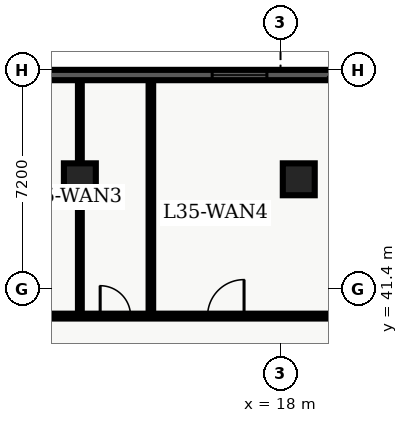
"""IFC4 building model, lengths in metres.
Left out: names, types, materials, properties, quantities, classifications, styles, units other than length and angle.
Written with IfcOpenShell. Run it as: python <this file> out.ifc"""

import sys

from ifc_helpers import new_model, entity, si_unit, converted_unit, direction, frame, origin_with_axes, origin_2d_with_axis, place, context, subcontext, project, spatial, polyline, rectangle, outline, extrude, element, fill, save


model = new_model("IFC4")
c1 = context("Model", 3, precision=1e-05, world=origin_with_axes(), true_north=direction((0.0, 1.0)))
c2 = subcontext(c1, "Body", "Model", "MODEL_VIEW")
j1 = project(units=[si_unit("LENGTHUNIT", "METRE"), converted_unit("PLANEANGLEUNIT", "DEGREE", entity("IfcPlaneAngleMeasure", 0.017), si_unit("PLANEANGLEUNIT", "RADIAN"), dimensions=[0, 0, 0, 0, 0, 0, 0])], contexts=[c1])
p1 = place(None, origin_with_axes())
s1 = spatial("IfcSite", under=j1, at=p1, CompositionType="ELEMENT")
p2 = place(p1, origin_with_axes())
s2 = spatial("IfcBuilding", under=s1, at=p2, CompositionType="ELEMENT")
p3 = place(p2, frame((0.0, 0.0, 144.6), z_axis=(0.0, 0.0, 1.0), x_axis=(1.0, 0.0, 0.0)))
s3 = spatial("IfcBuildingStorey", under=s2, at=p3, CompositionType="ELEMENT", Elevation=144.6)
for number, where, z_axis, x_axis in (
    (1, (11.4, 45.0, 0.0), (0.0, 0.0, 1.0), (1.0, 0.0, 0.0)),
    (2, (18.6, 45.0, 0.0), (0.0, 0.0, 1.0), (1.0, 0.0, 0.0)),
):
    element("IfcColumn", number, at=place(p3, frame(where, z_axis=z_axis, x_axis=x_axis)), inside=s3, PredefinedType="COLUMN", context=c2, shape_type="SweptSolid", body=[
        extrude(rectangle(XDim=1.05, YDim=1.05, at=origin_2d_with_axis()), origin_with_axes(), (0.0, 0.0, 1.0), 3.9),
    ])
p4 = place(p3, frame((2.6, 40.5, 0.0), z_axis=(0.0, 0.0, 1.0), x_axis=(1.0, 0.0, 0.0)))
e3 = element("IfcWall", 3, at=p4, inside=s3, PredefinedType="PARTITIONING", context=c2, shape_type="SweptSolid", body=[
    extrude(outline(polyline([(0.0, -0.08), (19.26, -0.08), (19.26, 0.08), (0.0, 0.08), (0.0, -0.08)])), origin_with_axes(), (0.0, 0.0, 1.0), 2.7),
])
p5 = place(p4, frame((1.084, 0.0, 0.0), z_axis=(0.0, 0.0, 1.0), x_axis=(1.0, 0.0, 0.0)))
e4 = element("IfcOpeningElement", 4, at=p5, cuts=e3, PredefinedType="OPENING", context=c2, shape_type="SweptSolid", body=[
    extrude(rectangle(XDim=1.0, YDim=0.18, at=origin_2d_with_axis()), origin_with_axes(), (0.0, 0.0, 1.0), 2.15),
])
p6 = place(p4, frame((6.049, 0.0, 0.0), z_axis=(0.0, 0.0, 1.0), x_axis=(1.0, 0.0, 0.0)))
e5 = element("IfcOpeningElement", 5, at=p6, cuts=e3, PredefinedType="OPENING", context=c2, shape_type="SweptSolid", body=[
    extrude(rectangle(XDim=1.0, YDim=0.18, at=origin_2d_with_axis()), origin_with_axes(), (0.0, 0.0, 1.0), 2.15),
])
p7 = place(p4, frame((9.968, 0.0, 0.0), z_axis=(0.0, 0.0, 1.0), x_axis=(1.0, 0.0, 0.0)))
e6 = element("IfcOpeningElement", 6, at=p7, cuts=e3, PredefinedType="OPENING", context=c2, shape_type="SweptSolid", body=[
    extrude(rectangle(XDim=1.0, YDim=0.18, at=origin_2d_with_axis()), origin_with_axes(), (0.0, 0.0, 1.0), 2.15),
])
p8 = place(p4, frame((13.601, 0.0, 0.0), z_axis=(0.0, 0.0, 1.0), x_axis=(1.0, 0.0, 0.0)))
e7 = element("IfcOpeningElement", 7, at=p8, cuts=e3, PredefinedType="OPENING", context=c2, shape_type="SweptSolid", body=[
    extrude(rectangle(XDim=1.2, YDim=0.18, at=origin_2d_with_axis()), origin_with_axes(), (0.0, 0.0, 1.0), 2.2),
])
p9 = place(p3, frame((11.4, 40.6, 0.0), z_axis=(0.0, 0.0, 1.0), x_axis=(0.0, 1.0, 0.0)))
e8 = element("IfcWall", 8, at=p9, inside=s3, PredefinedType="PARTITIONING", context=c2, shape_type="SweptSolid", body=[
    extrude(outline(polyline([(0.0, -0.062), (7.665, -0.062), (7.665, 0.062), (0.0, 0.062), (0.0, -0.062)])), origin_with_axes(), (0.0, 0.0, 1.0), 2.7),
])
p10 = place(p3, frame((13.736, 40.6, 0.0), z_axis=(0.0, 0.0, 1.0), x_axis=(0.0, 1.0, 0.0)))
e9 = element("IfcWall", 9, at=p10, inside=s3, PredefinedType="PARTITIONING", context=c2, shape_type="SweptSolid", body=[
    extrude(outline(polyline([(0.0, -0.075), (7.665, -0.075), (7.665, 0.075), (0.0, 0.075), (0.0, -0.075)])), origin_with_axes(), (0.0, 0.0, 1.0), 2.7),
])
p11 = place(p3, frame((2.74, 48.43, 0.0), z_axis=(0.0, 0.0, 1.0), x_axis=(1.0, 0.0, 0.0)))
e10 = element("IfcWall", 10, at=p11, inside=s3, PredefinedType="SOLIDWALL", context=c2, shape_type="SweptSolid", body=[
    extrude(outline(polyline([(0.0, -0.17), (17.175, -0.17), (17.175, 0.17), (0.0, 0.17), (0.0, -0.17)])), origin_with_axes(), (0.0, 0.0, 1.0), 3.66),
])
p12 = place(p11, frame((13.912, 0.0, 0.45), z_axis=(0.0, 0.0, 1.0), x_axis=(1.0, 0.0, 0.0)))
e11 = element("IfcOpeningElement", 11, at=p12, cuts=e10, PredefinedType="OPENING", context=c2, shape_type="SweptSolid", body=[
    extrude(rectangle(XDim=1.8, YDim=0.36, at=origin_2d_with_axis()), origin_with_axes(), (0.0, 0.0, 1.0), 2.1),
])
p13 = place(p4, frame((9.968, 0.0, 0.0), z_axis=(0.0, 0.0, 1.0), x_axis=(1.0, 0.0, 0.0)))
e12 = element("IfcDoor", 12, at=p13, inside=s3, OperationType="SINGLE_SWING_LEFT", PredefinedType="DOOR", context=c2, shape_type="SweptSolid", body=[
    extrude(rectangle(XDim=1.0, YDim=0.09, at=origin_2d_with_axis()), origin_with_axes(), (0.0, 0.0, 1.0), 2.15),
])
fill(e6, e12)
p14 = place(p4, frame((13.601, 0.0, 0.0), z_axis=(0.0, 0.0, 1.0), x_axis=(1.0, 0.0, 0.0)))
e13 = element("IfcDoor", 13, at=p14, inside=s3, OperationType="SINGLE_SWING_RIGHT", PredefinedType="DOOR", context=c2, shape_type="SweptSolid", body=[
    extrude(rectangle(XDim=1.2, YDim=0.09, at=origin_2d_with_axis()), origin_with_axes(), (0.0, 0.0, 1.0), 2.2),
])
fill(e7, e13)
p15 = place(p11, frame((13.912, 0.0, 0.45), z_axis=(0.0, 0.0, 1.0), x_axis=(1.0, 0.0, 0.0)))
e14 = element("IfcWindow", 14, at=p15, inside=s3, PredefinedType="WINDOW", context=c2, shape_type="SweptSolid", body=[
    extrude(rectangle(XDim=1.8, YDim=0.09, at=origin_2d_with_axis()), origin_with_axes(), (0.0, 0.0, 1.0), 2.1),
])
fill(e11, e14)
save(model, sys.argv[1])
